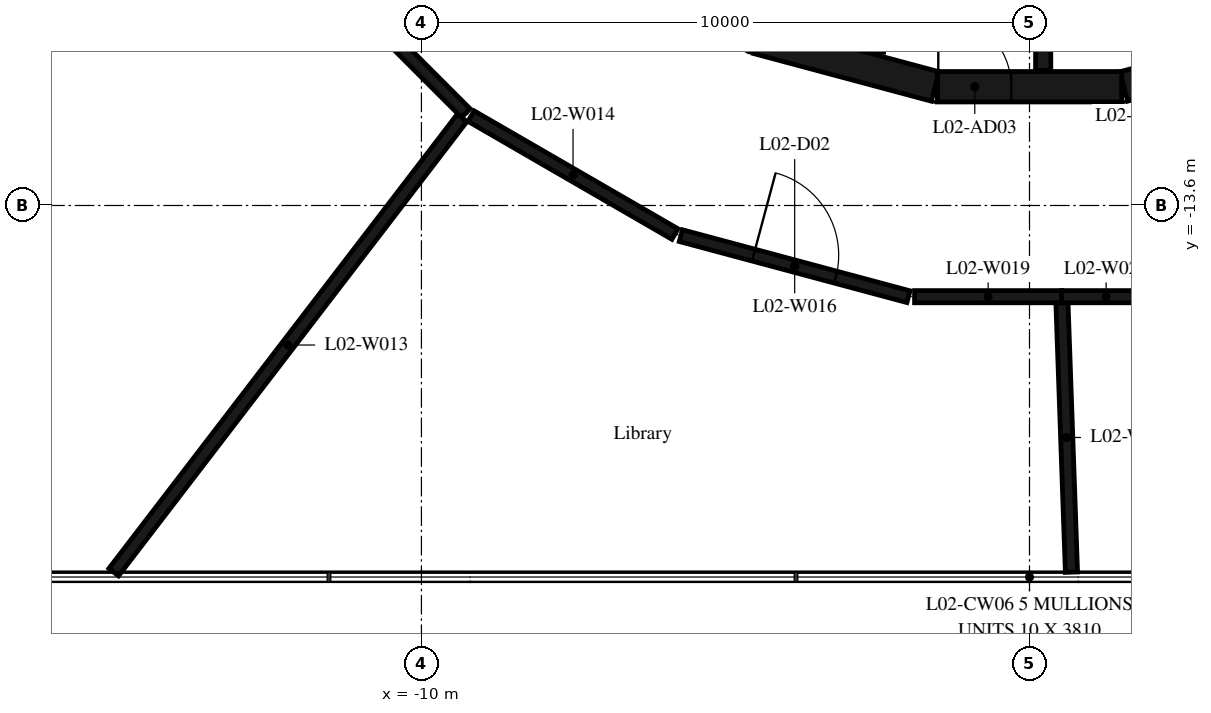
"""IFC4 building model, lengths in metres.
Left out: names, types, materials, properties, quantities, classifications, styles, units other than length and angle.
Written with IfcOpenShell. Run it as: python <this file> out.ifc"""

import sys

from ifc_helpers import new_model, si_unit, direction, frame, frame_2d, origin, place, context, subcontext, project, spatial, rectangle, extrude, element, fill, save


model = new_model("IFC4")
c1 = context("Model", 3, precision=1e-05, world=origin(), true_north=direction((0.0, 1.0)))
c2 = subcontext(c1, "Body", "Model", "MODEL_VIEW")
j1 = project(units=[si_unit("LENGTHUNIT", "METRE"), si_unit("PLANEANGLEUNIT", "RADIAN")], contexts=[c1])
p1 = place(None, origin())
s1 = spatial("IfcSite", under=j1, at=p1, CompositionType="ELEMENT")
p2 = place(p1, origin())
s2 = spatial("IfcBuilding", under=s1, at=p2, CompositionType="ELEMENT")
p3 = place(p2, frame((0.0, 0.0, 13.8)))
s3 = spatial("IfcBuildingStorey", under=s2, at=p3, CompositionType="ELEMENT", Elevation=13.8)
p4 = place(p3, frame((1.55, -11.643, 0.0), z_axis=(0.0, 0.0, 1.0), x_axis=(0.965948410781, 0.258734743916, 0.0)))
e1 = element("IfcWall", 1, at=p4, inside=s3, PredefinedType="SHEAR", context=c2, shape_type="SweptSolid", body=[
    extrude(rectangle(XDim=3.033, YDim=0.5, at=frame_2d((1.516, 0.0))), origin(), (0.0, 0.0, 1.0), 4.42),
])
p5 = place(p4, frame((1.066, 0.0, 0.0)))
e2 = element("IfcOpeningElement", 2, at=p5, cuts=e1, PredefinedType="OPENING", context=c2, shape_type="SweptSolid", body=[
    extrude(rectangle(XDim=0.9, YDim=2.1, at=frame_2d((0.45, 1.05))), frame((0.0, 0.26, 0.0), z_axis=(0.0, -1.0, 0.0), x_axis=(1.0, 0.0, 0.0)), (0.0, 0.0, 1.0), 0.52),
])
p6 = place(p3, frame((-4.479, -10.858, 0.0), z_axis=(0.0, 0.0, 1.0), x_axis=(0.965948410781, -0.258734743916, 0.0)))
e3 = element("IfcWall", 3, at=p6, inside=s3, PredefinedType="SHEAR", context=c2, shape_type="SweptSolid", body=[
    extrude(rectangle(XDim=3.033, YDim=0.5, at=frame_2d((1.516, 0.0))), origin(), (0.0, 0.0, 1.0), 4.42),
])
p7 = place(p3, frame((-1.516, -11.647, 0.0), z_axis=(0.0, 0.0, 1.0), x_axis=(1.0, 0.0, 0.0)))
e4 = element("IfcWall", 4, at=p7, inside=s3, PredefinedType="SHEAR", context=c2, shape_type="SweptSolid", body=[
    extrude(rectangle(XDim=3.033, YDim=0.5, at=frame_2d((1.516, 0.0))), origin(), (0.0, 0.0, 1.0), 4.42),
])
p8 = place(p7, frame((0.016, 0.0, 0.0)))
e5 = element("IfcOpeningElement", 5, at=p8, cuts=e4, PredefinedType="OPENING", context=c2, shape_type="SweptSolid", body=[
    extrude(rectangle(XDim=1.2, YDim=2.1, at=frame_2d((0.6, 1.05))), frame((0.0, 0.26, 0.0), z_axis=(0.0, -1.0, 0.0), x_axis=(1.0, 0.0, 0.0)), (0.0, 0.0, 1.0), 0.52),
])
p9 = place(p3, frame((0.225, -8.97, 0.0), z_axis=(0.0, 0.0, 1.0), x_axis=(0.0, -1.0, 0.0)))
e6 = element("IfcWall", 6, at=p9, inside=s3, PredefinedType="SHEAR", context=c2, shape_type="SweptSolid", body=[
    extrude(rectangle(XDim=2.41, YDim=0.25, at=frame_2d((1.205, 0.0))), origin(), (0.0, 0.0, 1.0), 4.42),
])
p10 = place(p3, frame((-12.009, -9.341, 0.0), z_axis=(0.0, 0.0, 1.0), x_axis=(0.707106781187, -0.707106781187, 0.0)))
e7 = element("IfcWall", 7, at=p10, inside=s3, PredefinedType="PARTITIONING", context=c2, shape_type="SweptSolid", body=[
    extrude(rectangle(XDim=3.874, YDim=0.2, at=frame_2d((1.937, 0.0))), origin(), (0.0, 0.0, 1.0), 4.42),
])
p11 = place(p3, frame((-9.331, -12.159, 0.0), z_axis=(0.0, 0.0, 1.0), x_axis=(-0.608558385637, -0.793509099677, 0.0)))
e8 = element("IfcWall", 8, at=p11, inside=s3, PredefinedType="PARTITIONING", context=c2, shape_type="SweptSolid", body=[
    extrude(rectangle(XDim=9.415, YDim=0.2, at=frame_2d((4.707, 0.0))), origin(), (0.0, 0.0, 1.0), 4.42),
])
p12 = place(p3, frame((-9.183, -12.13, 0.0), z_axis=(0.0, 0.0, 1.0), x_axis=(0.865585884642, -0.500760497952, 0.0)))
e9 = element("IfcWall", 9, at=p12, inside=s3, PredefinedType="PARTITIONING", context=c2, shape_type="SweptSolid", body=[
    extrude(rectangle(XDim=3.874, YDim=0.2, at=frame_2d((1.937, 0.0))), origin(), (0.0, 0.0, 1.0), 4.42),
])
p13 = place(p3, frame((-5.733, -14.096, 0.0), z_axis=(0.0, 0.0, 1.0), x_axis=(0.96585437197, -0.259085569159, 0.0)))
e10 = element("IfcWall", 10, at=p13, inside=s3, PredefinedType="PARTITIONING", context=c2, shape_type="SweptSolid", body=[
    extrude(rectangle(XDim=3.876, YDim=0.2, at=frame_2d((1.938, 0.0))), origin(), (0.0, 0.0, 1.0), 4.42),
])
p14 = place(p13, frame((1.238, 0.0, 0.0)))
e11 = element("IfcOpeningElement", 11, at=p14, cuts=e10, PredefinedType="OPENING", context=c2, shape_type="SweptSolid", body=[
    extrude(rectangle(XDim=1.4, YDim=2.1, at=frame_2d((0.7, 1.05))), frame((0.0, 0.11, 0.0), z_axis=(0.0, -1.0, 0.0), x_axis=(1.0, 0.0, 0.0)), (0.0, 0.0, 1.0), 0.22),
])
p15 = place(p3, frame((-1.89, -15.1, 0.0), z_axis=(0.0, 0.0, 1.0), x_axis=(1.0, 0.0, 0.0)))
e12 = element("IfcWall", 12, at=p15, inside=s3, PredefinedType="PARTITIONING", context=c2, shape_type="SweptSolid", body=[
    extrude(rectangle(XDim=2.42, YDim=0.2, at=frame_2d((1.21, 0.0))), origin(), (0.0, 0.0, 1.0), 4.42),
])
p16 = place(p3, frame((0.533, -15.2, 0.0), z_axis=(0.0, 0.0, 1.0), x_axis=(0.035304513721, -0.999376601343, 0.0)))
e13 = element("IfcWall", 13, at=p16, inside=s3, PredefinedType="PARTITIONING", context=c2, shape_type="SweptSolid", body=[
    extrude(rectangle(XDim=4.433, YDim=0.2, at=frame_2d((2.216, 0.0))), origin(), (0.0, 0.0, 1.0), 4.42),
])
p17 = place(p3, frame((0.53, -15.1, 0.0), z_axis=(0.0, 0.0, 1.0), x_axis=(1.0, 0.0, 0.0)))
e14 = element("IfcWall", 14, at=p17, inside=s3, PredefinedType="PARTITIONING", context=c2, shape_type="SweptSolid", body=[
    extrude(rectangle(XDim=1.46, YDim=0.2, at=frame_2d((0.73, 0.0))), origin(), (0.0, 0.0, 1.0), 4.42),
])
p18 = place(p8, origin())
e15 = element("IfcDoor", 15, at=p18, inside=s3, OperationType="SINGLE_SWING_RIGHT", PredefinedType="DOOR", context=c2, shape_type="SweptSolid", body=[
    extrude(rectangle(XDim=1.2, YDim=2.1, at=frame_2d((0.6, 1.05))), frame((0.0, 0.025, 0.0), z_axis=(0.0, -1.0, 0.0), x_axis=(1.0, 0.0, 0.0)), (0.0, 0.0, 1.0), 0.05),
])
fill(e5, e15)
p19 = place(p14, origin())
e16 = element("IfcDoor", 16, at=p19, inside=s3, OperationType="DOUBLE_DOOR_SINGLE_SWING", PredefinedType="DOOR", context=c2, shape_type="SweptSolid", body=[
    extrude(rectangle(XDim=1.4, YDim=2.1, at=frame_2d((0.7, 1.05))), frame((0.0, 0.025, 0.0), z_axis=(0.0, -1.0, 0.0), x_axis=(1.0, 0.0, 0.0)), (0.0, 0.0, 1.0), 0.05),
])
fill(e11, e16)
save(model, sys.argv[1])
